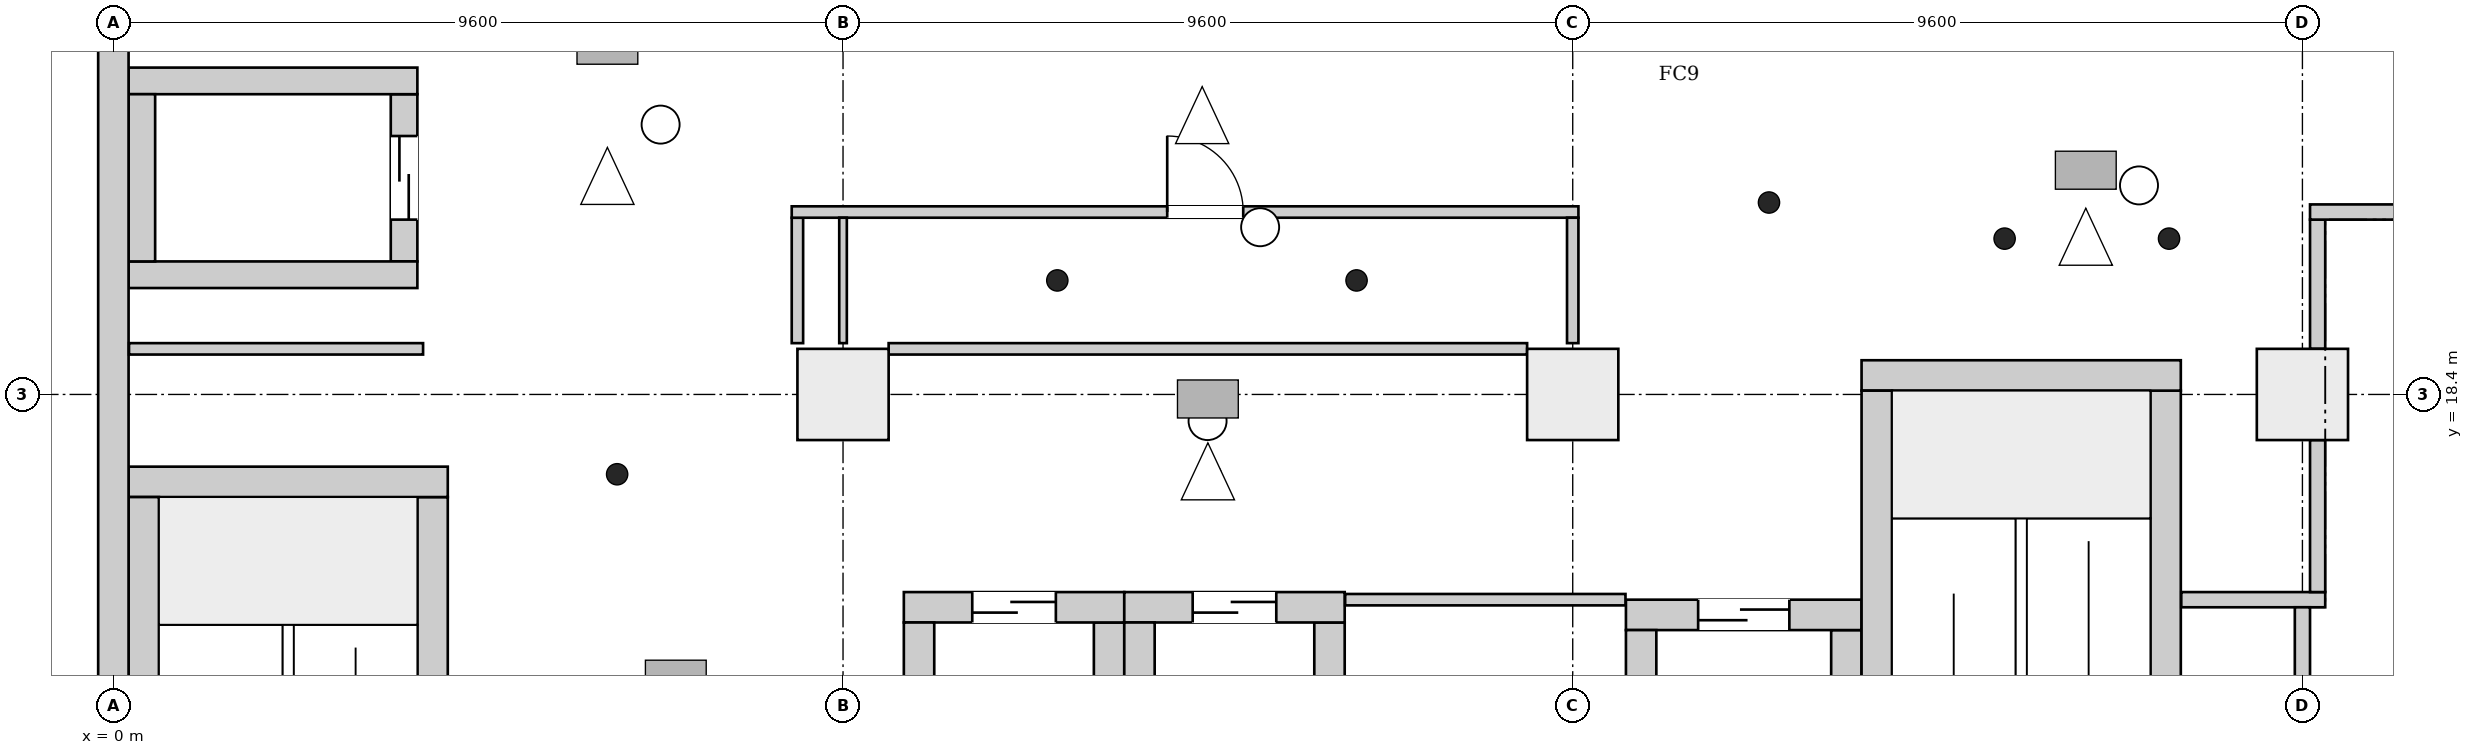
"""IFC4 building model, lengths in metres.
Left out: names, types, materials, properties, quantities, classifications, styles, units other than length and angle.
Written with IfcOpenShell. Run it as: python <this file> out.ifc"""

import sys

from ifc_helpers import new_model, si_unit, direction, frame, frame_2d, origin, origin_2d, place, context, subcontext, project, spatial, rectangle, extrude, element, fill, save


model = new_model("IFC4")
c1 = context("Model", 3, precision=1e-05, world=origin(), true_north=direction((0.0, 1.0)))
c2 = subcontext(c1, "Body", "Model", "MODEL_VIEW")
j1 = project(units=[si_unit("LENGTHUNIT", "METRE"), si_unit("PLANEANGLEUNIT", "RADIAN")], contexts=[c1])
p1 = place(None, origin())
s1 = spatial("IfcSite", under=j1, at=p1, CompositionType="ELEMENT")
p2 = place(p1, origin())
s2 = spatial("IfcBuilding", under=s1, at=p2, CompositionType="ELEMENT")
p3 = place(p2, frame((0.0, 0.0, 14.2)))
s3 = spatial("IfcBuildingStorey", under=s2, at=p3, CompositionType="ELEMENT", Elevation=14.2)
p4 = place(p3, frame((0.0, -0.2, 0.0), z_axis=(0.0, 0.0, 1.0), x_axis=(0.0, 1.0, 0.0)))
e1 = element("IfcWall", 1, at=p4, inside=s3, PredefinedType="SHEAR", context=c2, shape_type="SweptSolid", body=[
    extrude(rectangle(XDim=46.88, YDim=0.4, at=frame_2d((23.44, 0.0))), origin(), (0.0, 0.0, 1.0), 7.5),
])
p5 = place(p3, frame((0.2, 17.25, 0.0), z_axis=(0.0, 0.0, 1.0), x_axis=(1.0, 0.0, 0.0)))
e2 = element("IfcWall", 2, at=p5, inside=s3, PredefinedType="SHEAR", context=c2, shape_type="SweptSolid", body=[
    extrude(rectangle(XDim=4.2, YDim=0.4, at=frame_2d((2.1, 0.0))), origin(), (0.0, 0.0, 1.0), 7.5),
])
for number, where, z_axis, x_axis in (
    (3, (0.4, 10.45, 0.0), (0.0, 0.0, 1.0), (0.0, 1.0, 0.0)),
    (4, (4.2, 10.45, 0.0), (0.0, 0.0, 1.0), (0.0, 1.0, 0.0)),
):
    element("IfcWall", number, at=place(p3, frame(where, z_axis=z_axis, x_axis=x_axis)), inside=s3, PredefinedType="SHEAR", context=c2, shape_type="SweptSolid", body=[
        extrude(rectangle(XDim=6.6, YDim=0.4, at=frame_2d((3.3, 0.0))), origin(), (0.0, 0.0, 1.0), 7.5),
    ])
p6 = place(p3, frame((23.0, 18.65, 0.0), z_axis=(0.0, 0.0, 1.0), x_axis=(1.0, 0.0, 0.0)))
e5 = element("IfcWall", 5, at=p6, inside=s3, PredefinedType="SHEAR", context=c2, shape_type="SweptSolid", body=[
    extrude(rectangle(XDim=4.2, YDim=0.4, at=frame_2d((2.1, 0.0))), origin(), (0.0, 0.0, 1.0), 7.5),
])
for number, where, z_axis, x_axis in (
    (6, (23.2, 11.85, 0.0), (0.0, 0.0, 1.0), (0.0, 1.0, 0.0)),
    (7, (27.0, 11.85, 0.0), (0.0, 0.0, 1.0), (0.0, 1.0, 0.0)),
):
    element("IfcWall", number, at=place(p3, frame(where, z_axis=z_axis, x_axis=x_axis)), inside=s3, PredefinedType="SHEAR", context=c2, shape_type="SweptSolid", body=[
        extrude(rectangle(XDim=6.6, YDim=0.4, at=frame_2d((3.3, 0.0))), origin(), (0.0, 0.0, 1.0), 7.5),
    ])
for number, where, z_axis, x_axis in (
    (8, (0.2, 19.975, 0.0), (0.0, 0.0, 1.0), (1.0, 0.0, 0.0)),
    (9, (0.2, 22.525, 0.0), (0.0, 0.0, 1.0), (1.0, 0.0, 0.0)),
):
    element("IfcWall", number, at=place(p3, frame(where, z_axis=z_axis, x_axis=x_axis)), inside=s3, PredefinedType="SHEAR", context=c2, shape_type="SweptSolid", body=[
        extrude(rectangle(XDim=3.8, YDim=0.35, at=frame_2d((1.9, 0.0))), origin(), (0.0, 0.0, 1.0), 7.5),
    ])
p7 = place(p3, frame((0.375, 20.15, 0.0), z_axis=(0.0, 0.0, 1.0), x_axis=(0.0, 1.0, 0.0)))
e10 = element("IfcWall", 10, at=p7, inside=s3, PredefinedType="SHEAR", context=c2, shape_type="SweptSolid", body=[
    extrude(rectangle(XDim=2.2, YDim=0.35, at=frame_2d((1.1, 0.0))), origin(), (0.0, 0.0, 1.0), 7.5),
])
p8 = place(p3, frame((3.825, 20.15, 0.0), z_axis=(0.0, 0.0, 1.0), x_axis=(0.0, 1.0, 0.0)))
e11 = element("IfcWall", 11, at=p8, inside=s3, PredefinedType="SHEAR", context=c2, shape_type="SweptSolid", body=[
    extrude(rectangle(XDim=2.2, YDim=0.35, at=frame_2d((1.1, 0.0))), origin(), (0.0, 0.0, 1.0), 7.5),
])
p9 = place(p8, frame((0.55, 0.0, 0.0)))
e12 = element("IfcOpeningElement", 12, at=p9, cuts=e11, PredefinedType="OPENING", context=c2, shape_type="SweptSolid", body=[
    extrude(rectangle(XDim=1.1, YDim=2.1, at=frame_2d((0.55, 1.05))), frame((0.0, 0.185, 0.0), z_axis=(0.0, -1.0, 0.0), x_axis=(1.0, 0.0, 0.0)), (0.0, 0.0, 1.0), 0.37),
])
p10 = place(p3, frame((10.4, 15.6, 0.0), z_axis=(0.0, 0.0, 1.0), x_axis=(1.0, 0.0, 0.0)))
e13 = element("IfcWall", 13, at=p10, inside=s3, PredefinedType="SHEAR", context=c2, shape_type="SweptSolid", body=[
    extrude(rectangle(XDim=2.9, YDim=0.4, at=frame_2d((1.45, 0.0))), origin(), (0.0, 0.0, 1.0), 7.5),
])
p11 = place(p10, frame((0.9, 0.0, 0.0)))
e14 = element("IfcOpeningElement", 14, at=p11, cuts=e13, PredefinedType="OPENING", context=c2, shape_type="SweptSolid", body=[
    extrude(rectangle(XDim=1.1, YDim=2.1, at=frame_2d((0.55, 1.05))), frame((0.0, 0.21, 0.0), z_axis=(0.0, -1.0, 0.0), x_axis=(1.0, 0.0, 0.0)), (0.0, 0.0, 1.0), 0.42),
])
for number, where, z_axis, x_axis in (
    (15, (10.6, 12.4, 0.0), (0.0, 0.0, 1.0), (0.0, 1.0, 0.0)),
    (16, (13.1, 12.4, 0.0), (0.0, 0.0, 1.0), (0.0, 1.0, 0.0)),
):
    element("IfcWall", number, at=place(p3, frame(where, z_axis=z_axis, x_axis=x_axis)), inside=s3, PredefinedType="SHEAR", context=c2, shape_type="SweptSolid", body=[
        extrude(rectangle(XDim=3.0, YDim=0.4, at=frame_2d((1.5, 0.0))), origin(), (0.0, 0.0, 1.0), 7.5),
    ])
p12 = place(p3, frame((13.3, 15.6, 0.0), z_axis=(0.0, 0.0, 1.0), x_axis=(1.0, 0.0, 0.0)))
e17 = element("IfcWall", 17, at=p12, inside=s3, PredefinedType="SHEAR", context=c2, shape_type="SweptSolid", body=[
    extrude(rectangle(XDim=2.9, YDim=0.4, at=frame_2d((1.45, 0.0))), origin(), (0.0, 0.0, 1.0), 7.5),
])
p13 = place(p12, frame((0.9, 0.0, 0.0)))
e18 = element("IfcOpeningElement", 18, at=p13, cuts=e17, PredefinedType="OPENING", context=c2, shape_type="SweptSolid", body=[
    extrude(rectangle(XDim=1.1, YDim=2.1, at=frame_2d((0.55, 1.05))), frame((0.0, 0.21, 0.0), z_axis=(0.0, -1.0, 0.0), x_axis=(1.0, 0.0, 0.0)), (0.0, 0.0, 1.0), 0.42),
])
for number, where, z_axis, x_axis in (
    (19, (13.5, 12.4, 0.0), (0.0, 0.0, 1.0), (0.0, 1.0, 0.0)),
    (20, (16.0, 12.4, 0.0), (0.0, 0.0, 1.0), (0.0, 1.0, 0.0)),
):
    element("IfcWall", number, at=place(p3, frame(where, z_axis=z_axis, x_axis=x_axis)), inside=s3, PredefinedType="SHEAR", context=c2, shape_type="SweptSolid", body=[
        extrude(rectangle(XDim=3.0, YDim=0.4, at=frame_2d((1.5, 0.0))), origin(), (0.0, 0.0, 1.0), 7.5),
    ])
p14 = place(p3, frame((19.9, 15.5, 0.0), z_axis=(0.0, 0.0, 1.0), x_axis=(1.0, 0.0, 0.0)))
e21 = element("IfcWall", 21, at=p14, inside=s3, PredefinedType="SHEAR", context=c2, shape_type="SweptSolid", body=[
    extrude(rectangle(XDim=3.1, YDim=0.4, at=frame_2d((1.55, 0.0))), origin(), (0.0, 0.0, 1.0), 7.5),
])
p15 = place(p14, frame((0.95, 0.0, 0.0)))
e22 = element("IfcOpeningElement", 22, at=p15, cuts=e21, PredefinedType="OPENING", context=c2, shape_type="SweptSolid", body=[
    extrude(rectangle(XDim=1.2, YDim=2.1, at=frame_2d((0.6, 1.05))), frame((0.0, 0.21, 0.0), z_axis=(0.0, -1.0, 0.0), x_axis=(1.0, 0.0, 0.0)), (0.0, 0.0, 1.0), 0.42),
])
for number, where, z_axis, x_axis in (
    (23, (20.1, 11.9, 0.0), (0.0, 0.0, 1.0), (0.0, 1.0, 0.0)),
    (24, (22.8, 11.9, 0.0), (0.0, 0.0, 1.0), (0.0, 1.0, 0.0)),
):
    element("IfcWall", number, at=place(p3, frame(where, z_axis=z_axis, x_axis=x_axis)), inside=s3, PredefinedType="SHEAR", context=c2, shape_type="SweptSolid", body=[
        extrude(rectangle(XDim=3.4, YDim=0.4, at=frame_2d((1.7, 0.0))), origin(), (0.0, 0.0, 1.0), 7.5),
    ])
for number, where, z_axis, x_axis in (
    (25, (9.6, 18.4, 0.0), (0.0, 0.0, 1.0), (1.0, 0.0, 0.0)),
    (26, (19.2, 18.4, 0.0), (0.0, 0.0, 1.0), (1.0, 0.0, 0.0)),
    (27, (28.8, 18.4, 0.0), (0.0, 0.0, 1.0), (1.0, 0.0, 0.0)),
):
    element("IfcColumn", number, at=place(p3, frame(where, z_axis=z_axis, x_axis=x_axis)), inside=s3, PredefinedType="COLUMN", context=c2, shape_type="SweptSolid", body=[
        extrude(rectangle(XDim=1.2, YDim=1.2, at=origin_2d()), origin(), (0.0, 0.0, 1.0), 7.5),
    ])
p16 = place(p3, frame((0.206, 19.0, 0.0), z_axis=(0.0, 0.0, 1.0), x_axis=(1.0, 0.0, 0.0)))
e28 = element("IfcWall", 28, at=p16, inside=s3, PredefinedType="PARTITIONING", context=c2, shape_type="SweptSolid", body=[
    extrude(rectangle(XDim=3.869, YDim=0.15, at=frame_2d((1.935, 0.0))), origin(), (0.0, 0.0, 1.0), 7.15),
])
p17 = place(p3, frame((9.0, 19.075, 0.0), z_axis=(0.0, 0.0, 1.0), x_axis=(0.0, 1.0, 0.0)))
e29 = element("IfcWall", 29, at=p17, inside=s3, PredefinedType="PARTITIONING", context=c2, shape_type="SweptSolid", body=[
    extrude(rectangle(XDim=1.65, YDim=0.15, at=frame_2d((0.825, 0.0))), origin(), (0.0, 0.0, 1.0), 7.15),
])
p18 = place(p3, frame((8.925, 20.8, 0.0), z_axis=(0.0, 0.0, 1.0), x_axis=(1.0, 0.0, 0.0)))
e30 = element("IfcWall", 30, at=p18, inside=s3, PredefinedType="PARTITIONING", context=c2, shape_type="SweptSolid", body=[
    extrude(rectangle(XDim=10.35, YDim=0.15, at=frame_2d((5.175, 0.0))), origin(), (0.0, 0.0, 1.0), 7.15),
])
p19 = place(p18, frame((4.94, 0.0, 0.0)))
e31 = element("IfcOpeningElement", 31, at=p19, cuts=e30, PredefinedType="OPENING", context=c2, shape_type="SweptSolid", body=[
    extrude(rectangle(XDim=1.0, YDim=2.1, at=frame_2d((0.5, 1.05))), frame((0.0, 0.085, 0.0), z_axis=(0.0, -1.0, 0.0), x_axis=(1.0, 0.0, 0.0)), (0.0, 0.0, 1.0), 0.17),
])
p20 = place(p3, frame((9.6, 19.075, 0.0), z_axis=(0.0, 0.0, 1.0), x_axis=(0.0, 1.0, 0.0)))
e32 = element("IfcWall", 32, at=p20, inside=s3, PredefinedType="PARTITIONING", context=c2, shape_type="SweptSolid", body=[
    extrude(rectangle(XDim=1.65, YDim=0.1, at=frame_2d((0.825, 0.0))), origin(), (0.0, 0.0, 1.0), 6.75),
])
p21 = place(p3, frame((10.2, 19.0, 0.0), z_axis=(0.0, 0.0, 1.0), x_axis=(1.0, 0.0, 0.0)))
e33 = element("IfcWall", 33, at=p21, inside=s3, PredefinedType="PARTITIONING", context=c2, shape_type="SweptSolid", body=[
    extrude(rectangle(XDim=8.4, YDim=0.15, at=frame_2d((4.2, 0.0))), origin(), (0.0, 0.0, 1.0), 7.15),
])
p22 = place(p3, frame((16.206, 15.7, 0.0), z_axis=(0.0, 0.0, 1.0), x_axis=(1.0, 0.0, 0.0)))
e34 = element("IfcWall", 34, at=p22, inside=s3, PredefinedType="PARTITIONING", context=c2, shape_type="SweptSolid", body=[
    extrude(rectangle(XDim=3.688, YDim=0.15, at=frame_2d((1.844, 0.0))), origin(), (0.0, 0.0, 1.0), 7.15),
])
p23 = place(p3, frame((19.2, 19.075, 0.0), z_axis=(0.0, 0.0, 1.0), x_axis=(0.0, 1.0, 0.0)))
e35 = element("IfcWall", 35, at=p23, inside=s3, PredefinedType="PARTITIONING", context=c2, shape_type="SweptSolid", body=[
    extrude(rectangle(XDim=1.65, YDim=0.15, at=frame_2d((0.825, 0.0))), origin(), (0.0, 0.0, 1.0), 6.75),
])
p24 = place(p3, frame((27.206, 15.7, 0.0), z_axis=(0.0, 0.0, 1.0), x_axis=(1.0, 0.0, 0.0)))
e36 = element("IfcWall", 36, at=p24, inside=s3, PredefinedType="PARTITIONING", context=c2, shape_type="SweptSolid", body=[
    extrude(rectangle(XDim=1.894, YDim=0.2, at=frame_2d((0.947, 0.0))), origin(), (0.0, 0.0, 1.0), 7.15),
])
p25 = place(p3, frame((28.8, 11.6, 0.0), z_axis=(0.0, 0.0, 1.0), x_axis=(0.0, 1.0, 0.0)))
e37 = element("IfcWall", 37, at=p25, inside=s3, PredefinedType="PARTITIONING", context=c2, shape_type="SweptSolid", body=[
    extrude(rectangle(XDim=4.0, YDim=0.2, at=frame_2d((2.0, 0.0))), origin(), (0.0, 0.0, 1.0), 6.75),
])
p26 = place(p3, frame((29.0, 15.8, 0.0), z_axis=(0.0, 0.0, 1.0), x_axis=(0.0, 1.0, 0.0)))
e38 = element("IfcWall", 38, at=p26, inside=s3, PredefinedType="PARTITIONING", context=c2, shape_type="SweptSolid", body=[
    extrude(rectangle(XDim=2.0, YDim=0.2, at=frame_2d((1.0, 0.0))), origin(), (0.0, 0.0, 1.0), 6.75),
])
p27 = place(p3, frame((29.0, 19.0, 0.0), z_axis=(0.0, 0.0, 1.0), x_axis=(0.0, 1.0, 0.0)))
e39 = element("IfcWall", 39, at=p27, inside=s3, PredefinedType="PARTITIONING", context=c2, shape_type="SweptSolid", body=[
    extrude(rectangle(XDim=1.7, YDim=0.2, at=frame_2d((0.85, 0.0))), origin(), (0.0, 0.0, 1.0), 6.75),
])
p28 = place(p3, frame((28.9, 20.8, 0.0), z_axis=(0.0, 0.0, 1.0), x_axis=(1.0, 0.0, 0.0)))
e40 = element("IfcWall", 40, at=p28, inside=s3, PredefinedType="PARTITIONING", context=c2, shape_type="SweptSolid", body=[
    extrude(rectangle(XDim=28.494, YDim=0.2, at=frame_2d((14.247, 0.0))), origin(), (0.0, 0.0, 1.0), 7.15),
])
p29 = place(p28, frame((4.335, 0.0, 0.0)))
e41 = element("IfcOpeningElement", 41, at=p29, cuts=e40, PredefinedType="OPENING", context=c2, shape_type="SweptSolid", body=[
    extrude(rectangle(XDim=1.0, YDim=2.1, at=frame_2d((0.5, 1.05))), frame((0.0, 0.11, 0.0), z_axis=(0.0, -1.0, 0.0), x_axis=(1.0, 0.0, 0.0)), (0.0, 0.0, 1.0), 0.22),
])
p30 = place(p28, frame((13.8, 0.0, 0.0)))
e42 = element("IfcOpeningElement", 42, at=p30, cuts=e40, PredefinedType="OPENING", context=c2, shape_type="SweptSolid", body=[
    extrude(rectangle(XDim=1.0, YDim=2.1, at=frame_2d((0.5, 1.05))), frame((0.0, 0.11, 0.0), z_axis=(0.0, -1.0, 0.0), x_axis=(1.0, 0.0, 0.0)), (0.0, 0.0, 1.0), 0.22),
])
p31 = place(p28, frame((21.95, 0.0, 0.0)))
e43 = element("IfcOpeningElement", 43, at=p31, cuts=e40, PredefinedType="OPENING", context=c2, shape_type="SweptSolid", body=[
    extrude(rectangle(XDim=1.0, YDim=2.1, at=frame_2d((0.5, 1.05))), frame((0.0, 0.11, 0.0), z_axis=(0.0, -1.0, 0.0), x_axis=(1.0, 0.0, 0.0)), (0.0, 0.0, 1.0), 0.22),
])
p32 = place(p9, origin())
e44 = element("IfcDoor", 44, at=p32, inside=s3, OperationType="DOUBLE_DOOR_SLIDING", PredefinedType="DOOR", context=c2, shape_type="SweptSolid", body=[
    extrude(rectangle(XDim=1.1, YDim=2.1, at=frame_2d((0.55, 1.05))), frame((0.0, 0.025, 0.0), z_axis=(0.0, -1.0, 0.0), x_axis=(1.0, 0.0, 0.0)), (0.0, 0.0, 1.0), 0.05),
])
fill(e12, e44)
p33 = place(p11, origin())
e45 = element("IfcDoor", 45, at=p33, inside=s3, OperationType="DOUBLE_DOOR_SLIDING", PredefinedType="DOOR", context=c2, shape_type="SweptSolid", body=[
    extrude(rectangle(XDim=1.1, YDim=2.1, at=frame_2d((0.55, 1.05))), frame((0.0, 0.025, 0.0), z_axis=(0.0, -1.0, 0.0), x_axis=(1.0, 0.0, 0.0)), (0.0, 0.0, 1.0), 0.05),
])
fill(e14, e45)
p34 = place(p13, origin())
e46 = element("IfcDoor", 46, at=p34, inside=s3, OperationType="DOUBLE_DOOR_SLIDING", PredefinedType="DOOR", context=c2, shape_type="SweptSolid", body=[
    extrude(rectangle(XDim=1.1, YDim=2.1, at=frame_2d((0.55, 1.05))), frame((0.0, 0.025, 0.0), z_axis=(0.0, -1.0, 0.0), x_axis=(1.0, 0.0, 0.0)), (0.0, 0.0, 1.0), 0.05),
])
fill(e18, e46)
p35 = place(p15, origin())
e47 = element("IfcDoor", 47, at=p35, inside=s3, OperationType="DOUBLE_DOOR_SLIDING", PredefinedType="DOOR", context=c2, shape_type="SweptSolid", body=[
    extrude(rectangle(XDim=1.2, YDim=2.1, at=frame_2d((0.6, 1.05))), frame((0.0, 0.025, 0.0), z_axis=(0.0, -1.0, 0.0), x_axis=(1.0, 0.0, 0.0)), (0.0, 0.0, 1.0), 0.05),
])
fill(e22, e47)
p36 = place(p19, origin())
e48 = element("IfcDoor", 48, at=p36, inside=s3, OperationType="SINGLE_SWING_LEFT", PredefinedType="DOOR", context=c2, shape_type="SweptSolid", body=[
    extrude(rectangle(XDim=1.0, YDim=2.1, at=frame_2d((0.5, 1.05))), frame((0.0, 0.025, 0.0), z_axis=(0.0, -1.0, 0.0), x_axis=(1.0, 0.0, 0.0)), (0.0, 0.0, 1.0), 0.05),
])
fill(e31, e48)
save(model, sys.argv[1])
